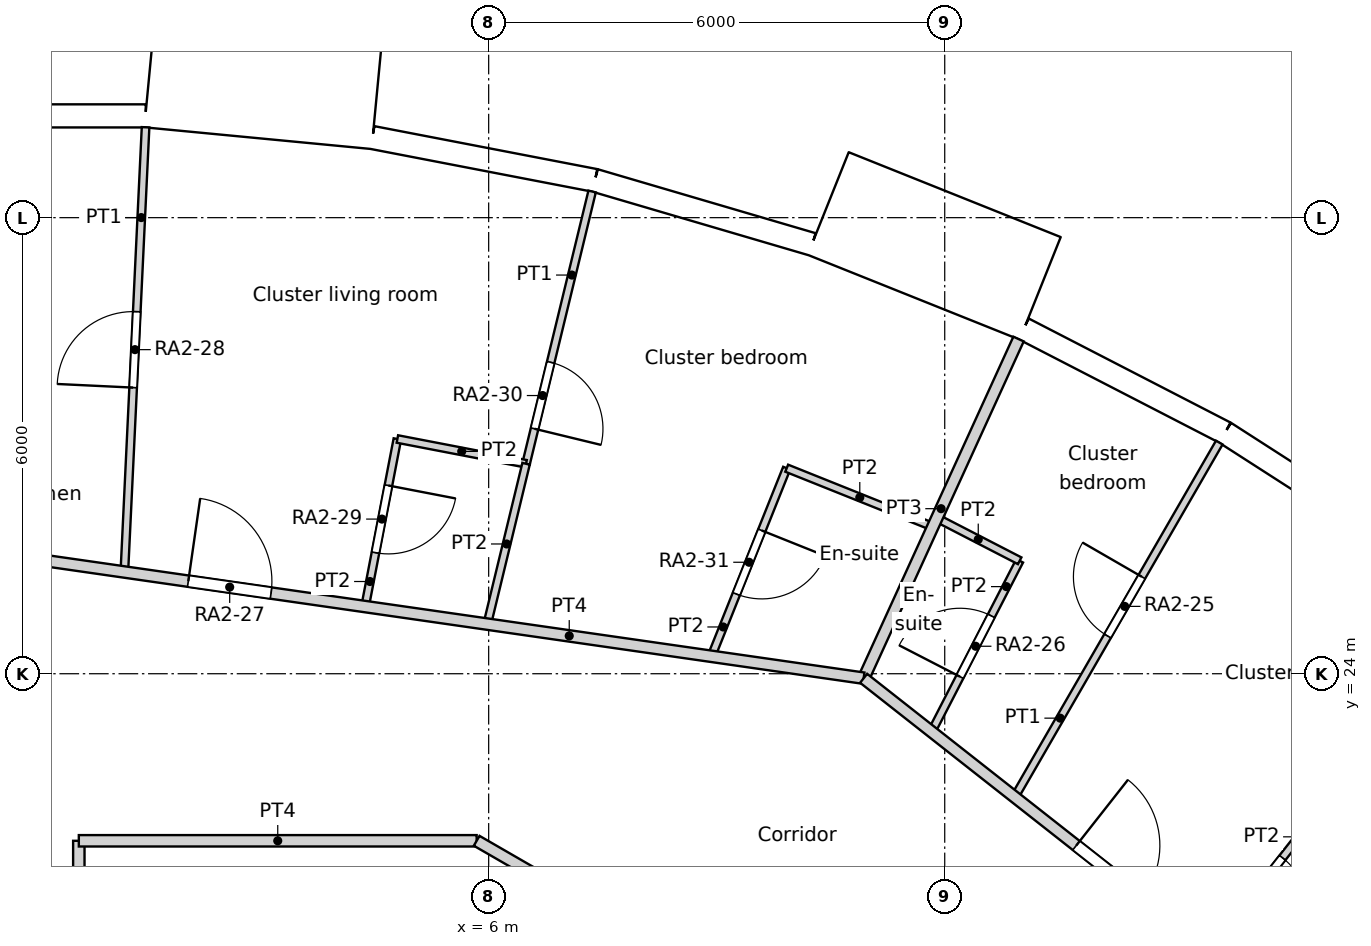
"""IFC4 building model, lengths in metres.
Left out: names, types, materials, properties, quantities, classifications, styles, units other than length and angle.
Written with IfcOpenShell. Run it as: python <this file> out.ifc"""

import sys

from ifc_helpers import new_model, si_unit, direction, frame, frame_2d, origin, origin_2d, place, context, subcontext, project, spatial, rectangle, circle, extrude, element, fill, save


model = new_model("IFC4")
c1 = context("Model", 3, precision=1e-05, world=origin(), true_north=direction((0.0, 1.0)))
c2 = subcontext(c1, "Body", "Model", "MODEL_VIEW")
j1 = project(units=[si_unit("LENGTHUNIT", "METRE"), si_unit("PLANEANGLEUNIT", "RADIAN")], contexts=[c1])
p1 = place(None, origin())
s1 = spatial("IfcSite", under=j1, at=p1, CompositionType="ELEMENT")
p2 = place(p1, origin())
s2 = spatial("IfcBuilding", under=s1, at=p2, CompositionType="ELEMENT")
p3 = place(p2, frame((0.0, 0.0, 39.0)))
s3 = spatial("IfcBuildingStorey", under=s2, at=p3, CompositionType="ELEMENT", Elevation=39.0)
for number, where, z_axis, x_axis in (
    (1, (12.576, 27.539, 0.0), (0.0, 0.0, 1.0), (1.0, 0.0, 0.0)),
    (2, (7.137, 29.421, 0.0), (0.0, 0.0, 1.0), (1.0, 0.0, 0.0)),
    (3, (1.44, 30.24, 0.0), (0.0, 0.0, 1.0), (1.0, 0.0, 0.0)),
):
    element("IfcColumn", number, at=place(p3, frame(where, z_axis=z_axis, x_axis=x_axis)), inside=s3, PredefinedType="COLUMN", context=c2, shape_type="SweptSolid", body=[
        extrude(circle(Radius=0.7, at=origin_2d()), origin(), (0.0, 0.0, 1.0), 3.6),
    ])
for number, where, z_axis, x_axis in (
    (4, (9.723, 22.54, 0.0), (0.0, 0.0, 1.0), (1.0, 0.0, 0.0)),
    (5, (4.263, 24.175, 0.0), (0.0, 0.0, 1.0), (1.0, 0.0, 0.0)),
):
    element("IfcColumn", number, at=place(p3, frame(where, z_axis=z_axis, x_axis=x_axis)), inside=s3, PredefinedType="COLUMN", context=c2, shape_type="SweptSolid", body=[
        extrude(circle(Radius=0.75, at=origin_2d()), origin(), (0.0, 0.0, 1.0), 3.6),
    ])
p4 = place(p3, frame((18.194, 25.56, 0.0), z_axis=(0.0, 0.0, 1.0), x_axis=(-0.84122372879, 0.540687190639, 0.0)))
e6 = element("IfcWall", 6, at=p4, inside=s3, PredefinedType="SOLIDWALL", context=c2, shape_type="SweptSolid", body=[
    extrude(rectangle(XDim=2.98, YDim=0.3, at=frame_2d((1.49, 0.0))), origin(), (0.0, 0.0, 1.0), 3.15),
])
p5 = place(p4, frame((1.49, 0.0, 1.55)))
e7 = element("IfcOpeningElement", 7, at=p5, cuts=e6, PredefinedType="OPENING", context=c2, shape_type="SweptSolid", body=[
    extrude(circle(Radius=0.9, at=origin_2d()), frame((0.0, 0.16, 0.0), z_axis=(0.0, -1.0, 0.0), x_axis=(1.0, 0.0, 0.0)), (0.0, 0.0, 1.0), 0.32),
])
p6 = place(p3, frame((15.687, 27.171, 0.0), z_axis=(0.0, 0.0, 1.0), x_axis=(-0.888853225096, 0.4581920386, 0.0)))
e8 = element("IfcWall", 8, at=p6, inside=s3, PredefinedType="SOLIDWALL", context=c2, shape_type="SweptSolid", body=[
    extrude(rectangle(XDim=2.979, YDim=0.3, at=frame_2d((1.49, 0.0))), origin(), (0.0, 0.0, 1.0), 3.15),
])
p7 = place(p6, frame((1.49, 0.0, 1.55)))
e9 = element("IfcOpeningElement", 9, at=p7, cuts=e8, PredefinedType="OPENING", context=c2, shape_type="SweptSolid", body=[
    extrude(circle(Radius=0.9, at=origin_2d()), frame((0.0, 0.16, 0.0), z_axis=(0.0, -1.0, 0.0), x_axis=(1.0, 0.0, 0.0)), (0.0, 0.0, 1.0), 0.32),
])
p8 = place(p3, frame((13.254, 29.07, -0.45), z_axis=(0.0, 0.0, 1.0), x_axis=(-0.928358776184, 0.371685327504, 0.0)))
e10 = element("IfcWall", 10, at=p8, inside=s3, PredefinedType="ELEMENTEDWALL", context=c2, shape_type="SweptSolid", body=[
    extrude(rectangle(XDim=3.0, YDim=1.45, at=frame_2d((1.5, 0.0))), origin(), (0.0, 0.0, 1.0), 3.6),
])
p9 = place(p8, frame((1.5, 0.0, 2.0)))
e11 = element("IfcOpeningElement", 11, at=p9, cuts=e10, PredefinedType="OPENING", context=c2, shape_type="SweptSolid", body=[
    extrude(circle(Radius=0.9, at=origin_2d()), frame((0.0, 0.735, 0.0), z_axis=(0.0, -1.0, 0.0), x_axis=(1.0, 0.0, 0.0)), (0.0, 0.0, 1.0), 1.47),
])
p10 = place(p3, frame((10.256, 29.651, 0.0), z_axis=(0.0, 0.0, 1.0), x_axis=(-0.959507586834, 0.28168278401, 0.0)))
e12 = element("IfcWall", 12, at=p10, inside=s3, PredefinedType="SOLIDWALL", context=c2, shape_type="SweptSolid", body=[
    extrude(rectangle(XDim=2.98, YDim=0.3, at=frame_2d((1.49, 0.0))), origin(), (0.0, 0.0, 1.0), 3.15),
])
p11 = place(p10, frame((1.49, 0.0, 1.55)))
e13 = element("IfcOpeningElement", 13, at=p11, cuts=e12, PredefinedType="OPENING", context=c2, shape_type="SweptSolid", body=[
    extrude(circle(Radius=0.9, at=origin_2d()), frame((0.0, 0.16, 0.0), z_axis=(0.0, -1.0, 0.0), x_axis=(1.0, 0.0, 0.0)), (0.0, 0.0, 1.0), 0.32),
])
p12 = place(p3, frame((7.397, 30.49, 0.0), z_axis=(0.0, 0.0, 1.0), x_axis=(-0.981924535406, 0.189272836848, 0.0)))
e14 = element("IfcWall", 14, at=p12, inside=s3, PredefinedType="SOLIDWALL", context=c2, shape_type="SweptSolid", body=[
    extrude(rectangle(XDim=2.98, YDim=0.3, at=frame_2d((1.49, 0.0))), origin(), (0.0, 0.0, 1.0), 3.15),
])
p13 = place(p12, frame((1.49, 0.0, 1.55)))
e15 = element("IfcOpeningElement", 15, at=p13, cuts=e14, PredefinedType="OPENING", context=c2, shape_type="SweptSolid", body=[
    extrude(circle(Radius=0.9, at=origin_2d()), frame((0.0, 0.16, 0.0), z_axis=(0.0, -1.0, 0.0), x_axis=(1.0, 0.0, 0.0)), (0.0, 0.0, 1.0), 0.32),
])
p14 = place(p3, frame((4.527, 31.627, -0.45), z_axis=(0.0, 0.0, 1.0), x_axis=(-0.995472768558, 0.09504718333, 0.0)))
e16 = element("IfcWall", 16, at=p14, inside=s3, PredefinedType="ELEMENTEDWALL", context=c2, shape_type="SweptSolid", body=[
    extrude(rectangle(XDim=3.0, YDim=1.45, at=frame_2d((1.5, 0.0))), origin(), (0.0, 0.0, 1.0), 3.6),
])
p15 = place(p14, frame((1.5, 0.0, 2.0)))
e17 = element("IfcOpeningElement", 17, at=p15, cuts=e16, PredefinedType="OPENING", context=c2, shape_type="SweptSolid", body=[
    extrude(circle(Radius=0.9, at=origin_2d()), frame((0.0, 0.735, 0.0), z_axis=(0.0, -1.0, 0.0), x_axis=(1.0, 0.0, 0.0)), (0.0, 0.0, 1.0), 1.47),
])
p16 = place(p3, frame((1.487, 31.339, 0.0), z_axis=(0.0, 0.0, 1.0), x_axis=(-1.0, 0.0, 0.0)))
e18 = element("IfcWall", 18, at=p16, inside=s3, PredefinedType="SOLIDWALL", context=c2, shape_type="SweptSolid", body=[
    extrude(rectangle(XDim=2.98, YDim=0.3, at=frame_2d((1.49, 0.0))), origin(), (0.0, 0.0, 1.0), 3.15),
])
p17 = place(p16, frame((1.49, 0.0, 1.55)))
e19 = element("IfcOpeningElement", 19, at=p17, cuts=e18, PredefinedType="OPENING", context=c2, shape_type="SweptSolid", body=[
    extrude(circle(Radius=0.9, at=origin_2d()), frame((0.0, 0.16, 0.0), z_axis=(0.0, -1.0, 0.0), x_axis=(1.0, 0.0, 0.0)), (0.0, 0.0, 1.0), 0.32),
])
p18 = place(p3, frame((10.933, 23.94, 0.0), z_axis=(0.0, 0.0, 1.0), x_axis=(0.786069782367, -0.618137765591, 0.0)))
e20 = element("IfcWall", 20, at=p18, inside=s3, PredefinedType="PARTITIONING", context=c2, shape_type="SweptSolid", body=[
    extrude(rectangle(XDim=12.41, YDim=0.15, at=frame_2d((6.205, 0.0))), origin(), (0.0, 0.0, 1.0), 3.15),
])
p19 = place(p18, frame((3.559, 0.0, 0.0)))
e21 = element("IfcOpeningElement", 21, at=p19, cuts=e20, PredefinedType="OPENING", context=c2, shape_type="SweptSolid", body=[
    extrude(rectangle(XDim=1.1, YDim=2.1, at=frame_2d((0.55, 1.05))), frame((0.0, 0.075, 0.0), z_axis=(0.0, -1.0, 0.0), x_axis=(1.0, 0.0, 0.0)), (0.0, 0.0, 1.0), 0.15),
])
p20 = place(p3, frame((5.842, 21.802, 0.0), z_axis=(0.0, 0.0, 1.0), x_axis=(0.865983505205, -0.500072563448, 0.0)))
e22 = element("IfcWall", 22, at=p20, inside=s3, PredefinedType="PARTITIONING", context=c2, shape_type="SweptSolid", body=[
    extrude(rectangle(XDim=4.265, YDim=0.15, at=frame_2d((2.133, 0.0))), origin(), (0.0, 0.0, 1.0), 3.15),
])
p21 = place(p3, frame((0.608, 21.802, 0.0), z_axis=(0.0, 0.0, 1.0), x_axis=(1.0, 0.0, 0.0)))
e23 = element("IfcWall", 23, at=p21, inside=s3, PredefinedType="PARTITIONING", context=c2, shape_type="SweptSolid", body=[
    extrude(rectangle(XDim=5.234, YDim=0.15, at=frame_2d((2.617, 0.0))), origin(), (0.0, 0.0, 1.0), 3.15),
])
p22 = place(p3, frame((0.608, 11.8, 0.0), z_axis=(0.0, 0.0, 1.0), x_axis=(0.0, 1.0, 0.0)))
e24 = element("IfcWall", 24, at=p22, inside=s3, PredefinedType="PARTITIONING", context=c2, shape_type="SweptSolid", body=[
    extrude(rectangle(XDim=10.002, YDim=0.15, at=frame_2d((5.001, 0.0))), origin(), (0.0, 0.0, 1.0), 3.15),
])
p23 = place(p22, frame((4.201, 0.0, 0.0)))
e25 = element("IfcOpeningElement", 25, at=p23, cuts=e24, PredefinedType="OPENING", context=c2, shape_type="SweptSolid", body=[
    extrude(rectangle(XDim=1.5, YDim=2.1, at=frame_2d((0.75, 1.05))), frame((0.0, 0.075, 0.0), z_axis=(0.0, -1.0, 0.0), x_axis=(1.0, 0.0, 0.0)), (0.0, 0.0, 1.0), 0.15),
])
p24 = place(p3, frame((-3.746, 26.05, 0.0), z_axis=(0.0, 0.0, 1.0), x_axis=(0.989841871115, -0.14217267736, 0.0)))
e26 = element("IfcWall", 26, at=p24, inside=s3, PredefinedType="PARTITIONING", context=c2, shape_type="SweptSolid", body=[
    extrude(rectangle(XDim=14.83, YDim=0.15, at=frame_2d((7.415, 0.0))), origin(), (0.0, 0.0, 1.0), 3.15),
])
p25 = place(p24, frame((5.854, 0.0, 0.0)))
e27 = element("IfcOpeningElement", 27, at=p25, cuts=e26, PredefinedType="OPENING", context=c2, shape_type="SweptSolid", body=[
    extrude(rectangle(XDim=1.1, YDim=2.1, at=frame_2d((0.55, 1.05))), frame((0.0, 0.075, 0.0), z_axis=(0.0, -1.0, 0.0), x_axis=(1.0, 0.0, 0.0)), (0.0, 0.0, 1.0), 0.15),
])
p26 = place(p3, frame((15.485, 20.361, 0.0), z_axis=(0.0, 0.0, 1.0), x_axis=(0.618203810204, 0.786017842704, 0.0)))
e28 = element("IfcWall", 28, at=p26, inside=s3, PredefinedType="PARTITIONING", context=c2, shape_type="SweptSolid", body=[
    extrude(rectangle(XDim=2.2, YDim=0.1, at=frame_2d((1.1, 0.0))), origin(), (0.0, 0.0, 1.0), 3.15),
])
p27 = place(p26, frame((0.65, 0.0, 0.0)))
e29 = element("IfcOpeningElement", 29, at=p27, cuts=e28, PredefinedType="OPENING", context=c2, shape_type="SweptSolid", body=[
    extrude(rectangle(XDim=0.9, YDim=2.0, at=frame_2d((0.45, 1.0))), frame((0.0, 0.05, 0.0), z_axis=(0.0, -1.0, 0.0), x_axis=(1.0, 0.0, 0.0)), (0.0, 0.0, 1.0), 0.1),
])
p28 = place(p3, frame((12.92, 22.378, 0.0), z_axis=(0.0, 0.0, 1.0), x_axis=(0.49998673258, 0.866033063597, 0.0)))
e30 = element("IfcWall", 30, at=p28, inside=s3, PredefinedType="PARTITIONING", context=c2, shape_type="SweptSolid", body=[
    extrude(rectangle(XDim=5.385, YDim=0.1, at=frame_2d((2.692, 0.0))), origin(), (0.0, 0.0, 1.0), 3.15),
])
p29 = place(p28, frame((2.446, 0.0, 0.0)))
e31 = element("IfcOpeningElement", 31, at=p29, cuts=e30, PredefinedType="OPENING", context=c2, shape_type="SweptSolid", body=[
    extrude(rectangle(XDim=0.9, YDim=2.1, at=frame_2d((0.45, 1.05))), frame((0.0, 0.05, 0.0), z_axis=(0.0, -1.0, 0.0), x_axis=(1.0, 0.0, 0.0)), (0.0, 0.0, 1.0), 0.1),
])
p30 = place(p3, frame((11.827, 23.237, 0.0), z_axis=(0.0, 0.0, 1.0), x_axis=(0.45814144004, 0.888879306159, 0.0)))
e32 = element("IfcWall", 32, at=p30, inside=s3, PredefinedType="PARTITIONING", context=c2, shape_type="SweptSolid", body=[
    extrude(rectangle(XDim=2.53, YDim=0.1, at=frame_2d((1.265, 0.0))), origin(), (0.0, 0.0, 1.0), 3.15),
])
p31 = place(p30, frame((0.815, 0.0, 0.0)))
e33 = element("IfcOpeningElement", 33, at=p31, cuts=e32, PredefinedType="OPENING", context=c2, shape_type="SweptSolid", body=[
    extrude(rectangle(XDim=0.9, YDim=2.04, at=frame_2d((0.45, 1.02))), frame((0.0, 0.05, 0.0), z_axis=(0.0, -1.0, 0.0), x_axis=(1.0, 0.0, 0.0)), (0.0, 0.0, 1.0), 0.1),
])
p32 = place(p3, frame((11.896, 26.048, 0.0), z_axis=(0.0, 0.0, 1.0), x_axis=(0.888824704595, -0.458247361697, 0.0)))
e34 = element("IfcWall", 34, at=p32, inside=s3, PredefinedType="PARTITIONING", context=c2, shape_type="SweptSolid", body=[
    extrude(rectangle(XDim=1.226, YDim=0.1, at=frame_2d((0.613, 0.0))), origin(), (0.0, 0.0, 1.0), 3.15),
])
p33 = place(p3, frame((10.934, 23.94, 0.0), z_axis=(0.0, 0.0, 1.0), x_axis=(0.415245800153, 0.909709253254, 0.0)))
e35 = element("IfcWall", 35, at=p33, inside=s3, PredefinedType="PARTITIONING", context=c2, shape_type="SweptSolid", body=[
    extrude(rectangle(XDim=4.906, YDim=0.15, at=frame_2d((2.453, 0.0))), origin(), (0.0, 0.0, 1.0), 3.15),
])
p34 = place(p3, frame((1.207, 25.339, 0.0), z_axis=(0.0, 0.0, 1.0), x_axis=(0.047648334785, 0.998864173045, 0.0)))
e36 = element("IfcWall", 36, at=p34, inside=s3, PredefinedType="PARTITIONING", context=c2, shape_type="SweptSolid", body=[
    extrude(rectangle(XDim=5.856, YDim=0.1, at=frame_2d((2.928, 0.0))), origin(), (0.0, 0.0, 1.0), 3.15),
])
p35 = place(p34, frame((2.428, 0.0, 0.0)))
e37 = element("IfcOpeningElement", 37, at=p35, cuts=e36, PredefinedType="OPENING", context=c2, shape_type="SweptSolid", body=[
    extrude(rectangle(XDim=1.0, YDim=2.04, at=frame_2d((0.5, 1.02))), frame((0.0, 0.05, 0.0), z_axis=(0.0, -1.0, 0.0), x_axis=(1.0, 0.0, 0.0)), (0.0, 0.0, 1.0), 0.1),
])
p36 = place(p3, frame((4.799, 27.088, 0.0), z_axis=(0.0, 0.0, 1.0), x_axis=(0.981966020483, -0.189057490243, 0.0)))
e38 = element("IfcWall", 38, at=p36, inside=s3, PredefinedType="PARTITIONING", context=c2, shape_type="SweptSolid", body=[
    extrude(rectangle(XDim=1.724, YDim=0.1, at=frame_2d((0.862, 0.0))), origin(), (0.0, 0.0, 1.0), 3.15),
])
p37 = place(p3, frame((4.374, 24.883, 0.0), z_axis=(0.0, 0.0, 1.0), x_axis=(0.189295003519, 0.981920262365, 0.0)))
e39 = element("IfcWall", 39, at=p37, inside=s3, PredefinedType="PARTITIONING", context=c2, shape_type="SweptSolid", body=[
    extrude(rectangle(XDim=2.245, YDim=0.1, at=frame_2d((1.123, 0.0))), origin(), (0.0, 0.0, 1.0), 3.15),
])
p38 = place(p37, frame((0.723, 0.0, 0.0)))
e40 = element("IfcOpeningElement", 40, at=p38, cuts=e39, PredefinedType="OPENING", context=c2, shape_type="SweptSolid", body=[
    extrude(rectangle(XDim=0.9, YDim=2.0, at=frame_2d((0.45, 1.0))), frame((0.0, 0.05, 0.0), z_axis=(0.0, -1.0, 0.0), x_axis=(1.0, 0.0, 0.0)), (0.0, 0.0, 1.0), 0.1),
])
p39 = place(p3, frame((6.492, 26.762, 0.0), z_axis=(0.0, 0.0, 1.0), x_axis=(0.235797175218, 0.971802290674, 0.0)))
e41 = element("IfcWall", 41, at=p39, inside=s3, PredefinedType="PARTITIONING", context=c2, shape_type="SweptSolid", body=[
    extrude(rectangle(XDim=3.686, YDim=0.1, at=frame_2d((1.843, 0.0))), origin(), (0.0, 0.0, 1.0), 3.15),
])
p40 = place(p39, frame((0.474, 0.0, 0.0)))
e42 = element("IfcOpeningElement", 42, at=p40, cuts=e41, PredefinedType="OPENING", context=c2, shape_type="SweptSolid", body=[
    extrude(rectangle(XDim=0.9, YDim=2.1, at=frame_2d((0.45, 1.05))), frame((0.0, 0.05, 0.0), z_axis=(0.0, -1.0, 0.0), x_axis=(1.0, 0.0, 0.0)), (0.0, 0.0, 1.0), 0.1),
])
p41 = place(p3, frame((5.981, 24.652, 0.0), z_axis=(0.0, 0.0, 1.0), x_axis=(0.235384360709, 0.971902362757, 0.0)))
e43 = element("IfcWall", 43, at=p41, inside=s3, PredefinedType="PARTITIONING", context=c2, shape_type="SweptSolid", body=[
    extrude(rectangle(XDim=2.171, YDim=0.1, at=frame_2d((1.085, 0.0))), origin(), (0.0, 0.0, 1.0), 3.15),
])
p42 = place(p3, frame((9.921, 26.704, 0.0), z_axis=(0.0, 0.0, 1.0), x_axis=(0.928346586681, -0.37171577179, 0.0)))
e44 = element("IfcWall", 44, at=p42, inside=s3, PredefinedType="PARTITIONING", context=c2, shape_type="SweptSolid", body=[
    extrude(rectangle(XDim=2.072, YDim=0.1, at=frame_2d((1.036, 0.0))), origin(), (0.0, 0.0, 1.0), 3.15),
])
p43 = place(p3, frame((8.93, 24.228, 0.0), z_axis=(0.0, 0.0, 1.0), x_axis=(0.371564281805, 0.928407229876, 0.0)))
e45 = element("IfcWall", 45, at=p43, inside=s3, PredefinedType="PARTITIONING", context=c2, shape_type="SweptSolid", body=[
    extrude(rectangle(XDim=2.667, YDim=0.1, at=frame_2d((1.333, 0.0))), origin(), (0.0, 0.0, 1.0), 3.15),
])
p44 = place(p43, frame((0.884, 0.0, 0.0)))
e46 = element("IfcOpeningElement", 46, at=p44, cuts=e45, PredefinedType="OPENING", context=c2, shape_type="SweptSolid", body=[
    extrude(rectangle(XDim=0.9, YDim=2.04, at=frame_2d((0.45, 1.02))), frame((0.0, 0.05, 0.0), z_axis=(0.0, -1.0, 0.0), x_axis=(1.0, 0.0, 0.0)), (0.0, 0.0, 1.0), 0.1),
])
p45 = place(p5, origin())
e47 = element("IfcWindow", 47, at=p45, inside=s3, PartitioningType="SINGLE_PANEL", PredefinedType="WINDOW", context=c2, shape_type="SweptSolid", body=[
    extrude(circle(Radius=0.9, at=origin_2d()), frame((0.0, 0.12, 0.0), z_axis=(0.0, -1.0, 0.0), x_axis=(1.0, 0.0, 0.0)), (0.0, 0.0, 1.0), 0.1),
])
fill(e7, e47)
p46 = place(p7, origin())
e48 = element("IfcWindow", 48, at=p46, inside=s3, PartitioningType="SINGLE_PANEL", PredefinedType="WINDOW", context=c2, shape_type="SweptSolid", body=[
    extrude(circle(Radius=0.9, at=origin_2d()), frame((0.0, 0.12, 0.0), z_axis=(0.0, -1.0, 0.0), x_axis=(1.0, 0.0, 0.0)), (0.0, 0.0, 1.0), 0.1),
])
fill(e9, e48)
p47 = place(p9, origin())
e49 = element("IfcWindow", 49, at=p47, inside=s3, PartitioningType="SINGLE_PANEL", PredefinedType="WINDOW", context=c2, shape_type="SweptSolid", body=[
    extrude(circle(Radius=0.9, at=origin_2d()), frame((0.0, 0.695, 0.0), z_axis=(0.0, -1.0, 0.0), x_axis=(1.0, 0.0, 0.0)), (0.0, 0.0, 1.0), 0.1),
])
fill(e11, e49)
p48 = place(p11, origin())
e50 = element("IfcWindow", 50, at=p48, inside=s3, PartitioningType="SINGLE_PANEL", PredefinedType="WINDOW", context=c2, shape_type="SweptSolid", body=[
    extrude(circle(Radius=0.9, at=origin_2d()), frame((0.0, 0.12, 0.0), z_axis=(0.0, -1.0, 0.0), x_axis=(1.0, 0.0, 0.0)), (0.0, 0.0, 1.0), 0.1),
])
fill(e13, e50)
p49 = place(p13, origin())
e51 = element("IfcWindow", 51, at=p49, inside=s3, PartitioningType="SINGLE_PANEL", PredefinedType="WINDOW", context=c2, shape_type="SweptSolid", body=[
    extrude(circle(Radius=0.9, at=origin_2d()), frame((0.0, 0.12, 0.0), z_axis=(0.0, -1.0, 0.0), x_axis=(1.0, 0.0, 0.0)), (0.0, 0.0, 1.0), 0.1),
])
fill(e15, e51)
p50 = place(p15, origin())
e52 = element("IfcWindow", 52, at=p50, inside=s3, PartitioningType="SINGLE_PANEL", PredefinedType="WINDOW", context=c2, shape_type="SweptSolid", body=[
    extrude(circle(Radius=0.9, at=origin_2d()), frame((0.0, 0.695, 0.0), z_axis=(0.0, -1.0, 0.0), x_axis=(1.0, 0.0, 0.0)), (0.0, 0.0, 1.0), 0.1),
])
fill(e17, e52)
p51 = place(p17, origin())
e53 = element("IfcWindow", 53, at=p51, inside=s3, PartitioningType="SINGLE_PANEL", PredefinedType="WINDOW", context=c2, shape_type="SweptSolid", body=[
    extrude(circle(Radius=0.9, at=origin_2d()), frame((0.0, 0.12, 0.0), z_axis=(0.0, -1.0, 0.0), x_axis=(1.0, 0.0, 0.0)), (0.0, 0.0, 1.0), 0.1),
])
fill(e19, e53)
p52 = place(p19, origin())
e54 = element("IfcDoor", 54, at=p52, inside=s3, OperationType="SINGLE_SWING_LEFT", PredefinedType="DOOR", context=c2, shape_type="SweptSolid", body=[
    extrude(rectangle(XDim=1.1, YDim=2.1, at=frame_2d((0.55, 1.05))), frame((0.0, 0.025, 0.0), z_axis=(0.0, -1.0, 0.0), x_axis=(1.0, 0.0, 0.0)), (0.0, 0.0, 1.0), 0.05),
])
fill(e21, e54)
p53 = place(p27, origin())
e55 = element("IfcDoor", 55, at=p53, inside=s3, OperationType="SINGLE_SWING_RIGHT", PredefinedType="DOOR", context=c2, shape_type="SweptSolid", body=[
    extrude(rectangle(XDim=0.9, YDim=2.0, at=frame_2d((0.45, 1.0))), frame((0.0, 0.025, 0.0), z_axis=(0.0, -1.0, 0.0), x_axis=(1.0, 0.0, 0.0)), (0.0, 0.0, 1.0), 0.05),
])
fill(e29, e55)
p54 = place(p29, origin())
e56 = element("IfcDoor", 56, at=p54, inside=s3, OperationType="SINGLE_SWING_RIGHT", PredefinedType="DOOR", context=c2, shape_type="SweptSolid", body=[
    extrude(rectangle(XDim=0.9, YDim=2.1, at=frame_2d((0.45, 1.05))), frame((0.0, 0.025, 0.0), z_axis=(0.0, -1.0, 0.0), x_axis=(1.0, 0.0, 0.0)), (0.0, 0.0, 1.0), 0.05),
])
fill(e31, e56)
p55 = place(p31, origin())
e57 = element("IfcDoor", 57, at=p55, inside=s3, OperationType="SINGLE_SWING_LEFT", PredefinedType="DOOR", context=c2, shape_type="SweptSolid", body=[
    extrude(rectangle(XDim=0.9, YDim=2.04, at=frame_2d((0.45, 1.02))), frame((0.0, 0.025, 0.0), z_axis=(0.0, -1.0, 0.0), x_axis=(1.0, 0.0, 0.0)), (0.0, 0.0, 1.0), 0.05),
])
fill(e33, e57)
p56 = place(p25, origin())
e58 = element("IfcDoor", 58, at=p56, inside=s3, OperationType="SINGLE_SWING_LEFT", PredefinedType="DOOR", context=c2, shape_type="SweptSolid", body=[
    extrude(rectangle(XDim=1.1, YDim=2.1, at=frame_2d((0.55, 1.05))), frame((0.0, 0.025, 0.0), z_axis=(0.0, -1.0, 0.0), x_axis=(1.0, 0.0, 0.0)), (0.0, 0.0, 1.0), 0.05),
])
fill(e27, e58)
p57 = place(p35, origin())
e59 = element("IfcDoor", 59, at=p57, inside=s3, OperationType="SINGLE_SWING_LEFT", PredefinedType="DOOR", context=c2, shape_type="SweptSolid", body=[
    extrude(rectangle(XDim=1.0, YDim=2.04, at=frame_2d((0.5, 1.02))), frame((0.0, 0.025, 0.0), z_axis=(0.0, -1.0, 0.0), x_axis=(1.0, 0.0, 0.0)), (0.0, 0.0, 1.0), 0.05),
])
fill(e37, e59)
p58 = place(p38, origin())
e60 = element("IfcDoor", 60, at=p58, inside=s3, OperationType="SINGLE_SWING_LEFT", PredefinedType="DOOR", context=c2, shape_type="SweptSolid", body=[
    extrude(rectangle(XDim=0.9, YDim=2.0, at=frame_2d((0.45, 1.0))), frame((0.0, 0.025, 0.0), z_axis=(0.0, -1.0, 0.0), x_axis=(1.0, 0.0, 0.0)), (0.0, 0.0, 1.0), 0.05),
])
fill(e40, e60)
p59 = place(p40, origin())
e61 = element("IfcDoor", 61, at=p59, inside=s3, OperationType="SINGLE_SWING_RIGHT", PredefinedType="DOOR", context=c2, shape_type="SweptSolid", body=[
    extrude(rectangle(XDim=0.9, YDim=2.1, at=frame_2d((0.45, 1.05))), frame((0.0, 0.025, 0.0), z_axis=(0.0, -1.0, 0.0), x_axis=(1.0, 0.0, 0.0)), (0.0, 0.0, 1.0), 0.05),
])
fill(e42, e61)
p60 = place(p44, origin())
e62 = element("IfcDoor", 62, at=p60, inside=s3, OperationType="SINGLE_SWING_LEFT", PredefinedType="DOOR", context=c2, shape_type="SweptSolid", body=[
    extrude(rectangle(XDim=0.9, YDim=2.04, at=frame_2d((0.45, 1.02))), frame((0.0, 0.025, 0.0), z_axis=(0.0, -1.0, 0.0), x_axis=(1.0, 0.0, 0.0)), (0.0, 0.0, 1.0), 0.05),
])
fill(e46, e62)
save(model, sys.argv[1])
